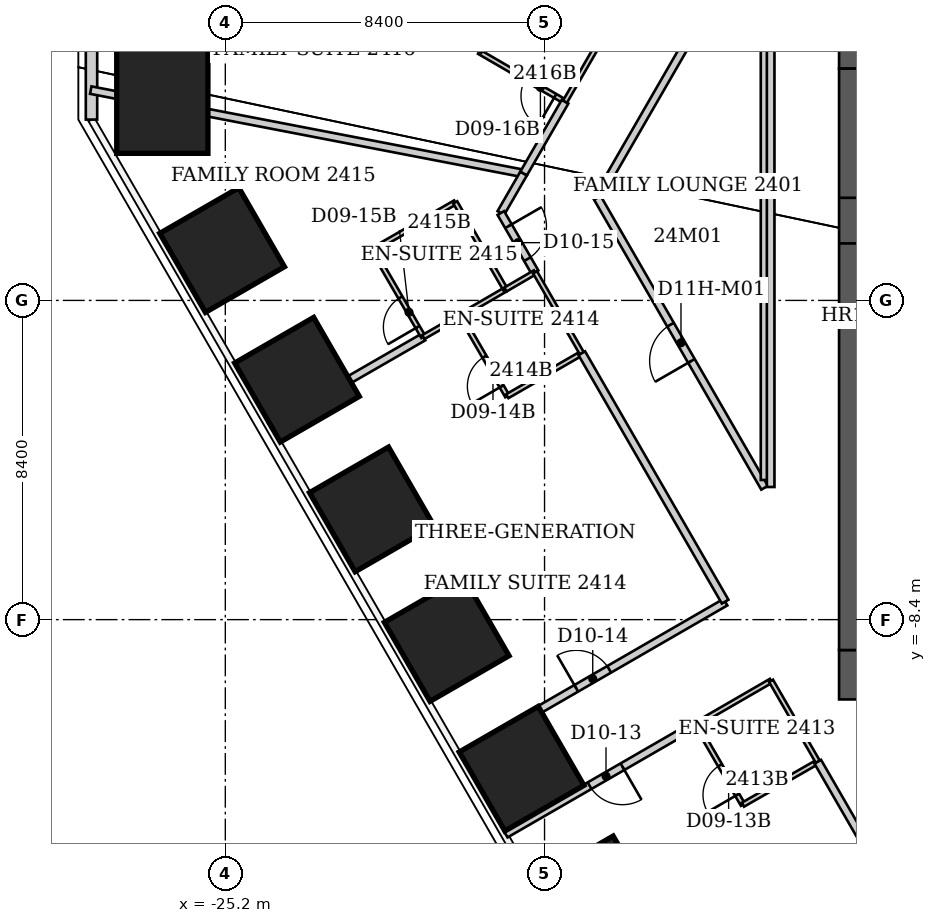
"""IFC4 building model, lengths in metres.
Left out: names, types, materials, properties, quantities, classifications, styles, units other than length and angle.
Written with IfcOpenShell. Run it as: python <this file> out.ifc"""

import sys

from ifc_helpers import new_model, si_unit, direction, frame, frame_2d, origin, origin_2d, place, context, subcontext, project, spatial, rectangle, extrude, element, fill, save


model = new_model("IFC4")
c1 = context("Model", 3, precision=1e-05, world=origin(), true_north=direction((0.0, 1.0)))
c2 = subcontext(c1, "Body", "Model", "MODEL_VIEW")
j1 = project(units=[si_unit("LENGTHUNIT", "METRE"), si_unit("PLANEANGLEUNIT", "RADIAN")], contexts=[c1])
p1 = place(None, origin())
s1 = spatial("IfcSite", under=j1, at=p1, CompositionType="ELEMENT")
p2 = place(p1, origin())
s2 = spatial("IfcBuilding", under=s1, at=p2, CompositionType="ELEMENT")
p3 = place(p2, frame((0.0, 0.0, 100.6)))
s3 = spatial("IfcBuildingStorey", under=s2, at=p3, CompositionType="ELEMENT", Elevation=100.6)
for number, where, z_axis, x_axis in (
    (1, (-15.434, -15.735, 0.0), (0.0, 0.0, 1.0), (-0.866, -0.5, 0.0)),
    (2, (-17.404, -12.323, 0.0), (0.0, 0.0, 1.0), (-0.866, -0.5, 0.0)),
    (3, (-19.374, -8.911, 0.0), (0.0, 0.0, 1.0), (-0.866, -0.5, 0.0)),
    (4, (-21.344, -5.499, 0.0), (0.0, 0.0, 1.0), (-0.866, -0.5, 0.0)),
    (5, (-23.314, -2.087, 0.0), (0.0, 0.0, 1.0), (-0.866, -0.5, 0.0)),
    (6, (-25.284, 1.325, 0.0), (0.0, 0.0, 1.0), (-0.866, -0.5, 0.0)),
):
    element("IfcColumn", number, at=place(p3, frame(where, z_axis=z_axis, x_axis=x_axis)), inside=s3, PredefinedType="COLUMN", context=c2, shape_type="SweptSolid", body=[
        extrude(rectangle(XDim=2.4, YDim=2.4, at=origin_2d()), origin(), (0.0, 0.0, 1.0), 3.8),
    ])
p4 = place(p3, frame((-26.857, 5.67, 0.0), z_axis=(0.0, 0.0, 1.0), x_axis=(-1.0, 0.0, 0.0)))
e7 = element("IfcColumn", 7, at=p4, inside=s3, PredefinedType="COLUMN", context=c2, shape_type="SweptSolid", body=[
    extrude(rectangle(XDim=2.4, YDim=3.6, at=origin_2d()), origin(), (0.0, 0.0, 1.0), 3.8),
])
p5 = place(p3, frame((-9.05, 6.75, 0.0), z_axis=(0.0, 0.0, 1.0), x_axis=(1.0, 0.0, 0.0)))
e8 = element("IfcWall", 8, at=p5, inside=s3, PredefinedType="SHEAR", context=c2, shape_type="SweptSolid", body=[
    extrude(rectangle(XDim=18.1, YDim=1.3, at=frame_2d((9.05, 0.0))), origin(), (0.0, 0.0, 1.0), 3.8),
])
p6 = place(p3, frame((-9.05, -9.85, 0.0), z_axis=(0.0, 0.0, 1.0), x_axis=(1.0, 0.0, 0.0)))
e9 = element("IfcWall", 9, at=p6, inside=s3, PredefinedType="SHEAR", context=c2, shape_type="SweptSolid", body=[
    extrude(rectangle(XDim=18.1, YDim=1.3, at=frame_2d((9.05, 0.0))), origin(), (0.0, 0.0, 1.0), 3.8),
])
p7 = place(p6, frame((1.938, 0.0, 0.0)))
e10 = element("IfcOpeningElement", 10, at=p7, cuts=e9, PredefinedType="OPENING", context=c2, shape_type="SweptSolid", body=[
    extrude(rectangle(XDim=1.1, YDim=2.2, at=frame_2d((0.55, 1.1))), frame((0.0, 0.65, 0.0), z_axis=(0.0, -1.0, 0.0), x_axis=(1.0, 0.0, 0.0)), (0.0, 0.0, 1.0), 1.3),
])
p8 = place(p6, frame((9.812, 0.0, 0.0)))
e11 = element("IfcOpeningElement", 11, at=p8, cuts=e9, PredefinedType="OPENING", context=c2, shape_type="SweptSolid", body=[
    extrude(rectangle(XDim=1.1, YDim=2.1, at=frame_2d((0.55, 1.05))), frame((0.0, 0.65, 0.0), z_axis=(0.0, -1.0, 0.0), x_axis=(1.0, 0.0, 0.0)), (0.0, 0.0, 1.0), 1.3),
])
p9 = place(p6, frame((12.438, 0.0, 0.0)))
e12 = element("IfcOpeningElement", 12, at=p9, cuts=e9, PredefinedType="OPENING", context=c2, shape_type="SweptSolid", body=[
    extrude(rectangle(XDim=1.1, YDim=2.1, at=frame_2d((0.55, 1.05))), frame((0.0, 0.65, 0.0), z_axis=(0.0, -1.0, 0.0), x_axis=(1.0, 0.0, 0.0)), (0.0, 0.0, 1.0), 1.3),
])
p10 = place(p6, frame((15.062, 0.0, 0.0)))
e13 = element("IfcOpeningElement", 13, at=p10, cuts=e9, PredefinedType="OPENING", context=c2, shape_type="SweptSolid", body=[
    extrude(rectangle(XDim=1.1, YDim=2.1, at=frame_2d((0.55, 1.05))), frame((0.0, 0.65, 0.0), z_axis=(0.0, -1.0, 0.0), x_axis=(1.0, 0.0, 0.0)), (0.0, 0.0, 1.0), 1.3),
])
p11 = place(p3, frame((-8.4, -9.2, 0.0), z_axis=(0.0, 0.0, 1.0), x_axis=(0.0, 1.0, 0.0)))
e14 = element("IfcWall", 14, at=p11, inside=s3, PredefinedType="SHEAR", context=c2, shape_type="SweptSolid", body=[
    extrude(rectangle(XDim=15.3, YDim=1.3, at=frame_2d((7.65, 0.0))), origin(), (0.0, 0.0, 1.0), 3.8),
])
p12 = place(p11, frame((10.7, 0.0, 0.0)))
e15 = element("IfcOpeningElement", 15, at=p12, cuts=e14, PredefinedType="OPENING", context=c2, shape_type="SweptSolid", body=[
    extrude(rectangle(XDim=1.2, YDim=2.2, at=frame_2d((0.6, 1.1))), frame((0.0, 0.65, 0.0), z_axis=(0.0, -1.0, 0.0), x_axis=(1.0, 0.0, 0.0)), (0.0, 0.0, 1.0), 1.3),
])
p13 = place(p3, frame((-28.721, 4.759, 0.0), z_axis=(0.0, 0.0, 1.0), x_axis=(0.0, 1.0, 0.0)))
e16 = element("IfcWall", 16, at=p13, inside=s3, PredefinedType="SOLIDWALL", context=c2, shape_type="SweptSolid", body=[
    extrude(rectangle(XDim=1.88, YDim=0.3, at=frame_2d((0.94, 0.0))), origin(), (0.0, 0.0, 1.0), 3.64),
])
p14 = place(p3, frame((-28.74, 5.534, 0.0), z_axis=(0.0, 0.0, 1.0), x_axis=(0.981941558077, -0.189184503913, 0.0)))
e17 = element("IfcWall", 17, at=p14, inside=s3, PredefinedType="PARTITIONING", context=c2, shape_type="SweptSolid", body=[
    extrude(rectangle(XDim=11.55, YDim=0.2, at=frame_2d((5.775, 0.0))), origin(), (0.0, 0.0, 1.0), 3.64),
])
p15 = place(p3, frame((-24.034, -3.295, 0.0), z_axis=(0.0, 0.0, 1.0), x_axis=(0.866451815884, 0.499260704193, 0.0)))
e18 = element("IfcWall", 18, at=p15, inside=s3, PredefinedType="PARTITIONING", context=c2, shape_type="SweptSolid", body=[
    extrude(rectangle(XDim=4.669, YDim=0.2, at=frame_2d((2.335, 0.0))), origin(), (0.0, 0.0, 1.0), 3.64),
])
p16 = place(p3, frame((-21.32, 1.33, 0.0), z_axis=(0.0, 0.0, 1.0), x_axis=(0.502242265546, -0.864726954997, 0.0)))
e19 = element("IfcWall", 19, at=p16, inside=s3, PredefinedType="PARTITIONING", context=c2, shape_type="SweptSolid", body=[
    extrude(rectangle(XDim=2.648, YDim=0.12, at=frame_2d((1.324, 0.0))), origin(), (0.0, 0.0, 1.0), 3.64),
])
p17 = place(p16, frame((1.448, 0.0, 0.0)))
e20 = element("IfcOpeningElement", 20, at=p17, cuts=e19, PredefinedType="OPENING", context=c2, shape_type="SweptSolid", body=[
    extrude(rectangle(XDim=0.9, YDim=2.03, at=frame_2d((0.45, 1.015))), frame((0.0, 0.06, 0.0), z_axis=(0.0, -1.0, 0.0), x_axis=(1.0, 0.0, 0.0)), (0.0, 0.0, 1.0), 0.12),
])
p18 = place(p3, frame((-19.988, -0.964, 0.0), z_axis=(0.0, 0.0, 1.0), x_axis=(0.866387145727, 0.49937292049, 0.0)))
e21 = element("IfcWall", 21, at=p18, inside=s3, PredefinedType="PARTITIONING", context=c2, shape_type="SweptSolid", body=[
    extrude(rectangle(XDim=1.129, YDim=0.12, at=frame_2d((0.564, 0.0))), origin(), (0.0, 0.0, 1.0), 3.64),
])
p19 = place(p3, frame((-19.15, 2.58, 0.0), z_axis=(0.0, 0.0, 1.0), x_axis=(-0.86653430447, -0.499117520406, 0.0)))
e22 = element("IfcWall", 22, at=p19, inside=s3, PredefinedType="PARTITIONING", context=c2, shape_type="SweptSolid", body=[
    extrude(rectangle(XDim=2.504, YDim=0.12, at=frame_2d((1.252, 0.0))), origin(), (0.0, 0.0, 1.0), 3.038),
])
p20 = place(p3, frame((-19.024, -11.975, 0.0), z_axis=(0.0, 0.0, 1.0), x_axis=(0.865863907772, 0.500279615034, 0.0)))
e23 = element("IfcWall", 23, at=p20, inside=s3, PredefinedType="PARTITIONING", context=c2, shape_type="SweptSolid", body=[
    extrude(rectangle(XDim=8.066, YDim=0.2, at=frame_2d((4.033, 0.0))), origin(), (0.0, 0.0, 1.0), 3.64),
])
p21 = place(p20, frame((3.533, 0.0, 0.0)))
e24 = element("IfcOpeningElement", 24, at=p21, cuts=e23, PredefinedType="OPENING", context=c2, shape_type="SweptSolid", body=[
    extrude(rectangle(XDim=1.0, YDim=2.13, at=frame_2d((0.5, 1.065))), frame((0.0, 0.1, 0.0), z_axis=(0.0, -1.0, 0.0), x_axis=(1.0, 0.0, 0.0)), (0.0, 0.0, 1.0), 0.2),
])
p22 = place(p3, frame((-19.01, -0.4, 0.0), z_axis=(0.0, 0.0, 1.0), x_axis=(0.864425960582, 0.502760140297, 0.0)))
e25 = element("IfcWall", 25, at=p22, inside=s3, PredefinedType="PARTITIONING", context=c2, shape_type="SweptSolid", body=[
    extrude(rectangle(XDim=1.367, YDim=0.12, at=frame_2d((0.684, 0.0))), origin(), (0.0, 0.0, 1.0), 3.64),
])
p23 = place(p3, frame((-19.01, -0.4, 0.0), z_axis=(0.0, 0.0, 1.0), x_axis=(0.501813488763, -0.864975850817, 0.0)))
e26 = element("IfcWall", 26, at=p23, inside=s3, PredefinedType="PARTITIONING", context=c2, shape_type="SweptSolid", body=[
    extrude(rectangle(XDim=2.451, YDim=0.12, at=frame_2d((1.226, 0.0))), origin(), (0.0, 0.0, 1.0), 3.64),
])
p24 = place(p23, frame((1.251, 0.0, 0.0)))
e27 = element("IfcOpeningElement", 27, at=p24, cuts=e26, PredefinedType="OPENING", context=c2, shape_type="SweptSolid", body=[
    extrude(rectangle(XDim=0.9, YDim=2.03, at=frame_2d((0.45, 1.015))), frame((0.0, 0.06, 0.0), z_axis=(0.0, -1.0, 0.0), x_axis=(1.0, 0.0, 0.0)), (0.0, 0.0, 1.0), 0.12),
])
p25 = place(p3, frame((-18.52, 6.54, 0.0), z_axis=(0.0, 0.0, 1.0), x_axis=(0.865155281359, -0.50150407689, 0.0)))
e28 = element("IfcWall", 28, at=p25, inside=s3, PredefinedType="PARTITIONING", context=c2, shape_type="SweptSolid", body=[
    extrude(rectangle(XDim=2.612, YDim=0.12, at=frame_2d((1.306, 0.0))), origin(), (0.0, 0.0, 1.0), 3.64),
])
p26 = place(p25, frame((1.412, 0.0, 0.0)))
e29 = element("IfcOpeningElement", 29, at=p26, cuts=e28, PredefinedType="OPENING", context=c2, shape_type="SweptSolid", body=[
    extrude(rectangle(XDim=0.9, YDim=2.03, at=frame_2d((0.45, 1.015))), frame((0.0, 0.06, 0.0), z_axis=(0.0, -1.0, 0.0), x_axis=(1.0, 0.0, 0.0)), (0.0, 0.0, 1.0), 0.12),
])
p27 = place(p3, frame((-17.95, 2.3, 0.0), z_axis=(0.0, 0.0, 1.0), x_axis=(0.499616828121, 0.866246515178, 0.0)))
e30 = element("IfcWall", 30, at=p27, inside=s3, PredefinedType="PARTITIONING", context=c2, shape_type="SweptSolid", body=[
    extrude(rectangle(XDim=1.201, YDim=0.2, at=frame_2d((0.6, 0.0))), origin(), (0.0, 0.0, 1.0), 3.64),
])
p28 = place(p3, frame((-17.95, 2.3, 0.0), z_axis=(0.0, 0.0, 1.0), x_axis=(0.499667687562, -0.866217179469, 0.0)))
e31 = element("IfcWall", 31, at=p28, inside=s3, PredefinedType="PARTITIONING", context=c2, shape_type="SweptSolid", body=[
    extrude(rectangle(XDim=1.801, YDim=0.2, at=frame_2d((0.9, 0.0))), origin(), (0.0, 0.0, 1.0), 3.64),
])
p29 = place(p28, frame((0.4, 0.0, 0.0)))
e32 = element("IfcOpeningElement", 32, at=p29, cuts=e31, PredefinedType="OPENING", context=c2, shape_type="SweptSolid", body=[
    extrude(rectangle(XDim=1.0, YDim=2.13, at=frame_2d((0.5, 1.065))), frame((0.0, 0.1, 0.0), z_axis=(0.0, -1.0, 0.0), x_axis=(1.0, 0.0, 0.0)), (0.0, 0.0, 1.0), 0.2),
])
p30 = place(p3, frame((-17.83, 0.29, 0.0), z_axis=(0.0, 0.0, 1.0), x_axis=(-0.499338582192, 0.866406936915, 0.0)))
e33 = element("IfcWall", 33, at=p30, inside=s3, PredefinedType="PARTITIONING", context=c2, shape_type="SweptSolid", body=[
    extrude(rectangle(XDim=2.643, YDim=0.12, at=frame_2d((1.322, 0.0))), origin(), (0.0, 0.0, 1.0), 3.64),
])
p31 = place(p3, frame((-17.828, 0.287, 0.0), z_axis=(0.0, 0.0, 1.0), x_axis=(0.864446899112, 0.502724137689, 0.0)))
e34 = element("IfcWall", 34, at=p31, inside=s3, PredefinedType="PARTITIONING", context=c2, shape_type="SweptSolid", body=[
    extrude(rectangle(XDim=0.9, YDim=0.12, at=frame_2d((0.45, 0.0))), origin(), (0.0, 0.0, 1.0), 3.64),
])
p32 = place(p3, frame((-17.824, -14.045, 0.0), z_axis=(0.0, 0.0, 1.0), x_axis=(0.866007919525, 0.500030282404, 0.0)))
e35 = element("IfcWall", 35, at=p32, inside=s3, PredefinedType="PARTITIONING", context=c2, shape_type="SweptSolid", body=[
    extrude(rectangle(XDim=5.79, YDim=0.2, at=frame_2d((2.895, 0.0))), origin(), (0.0, 0.0, 1.0), 3.64),
])
p33 = place(p32, frame((2.55, 0.0, 0.0)))
e36 = element("IfcOpeningElement", 36, at=p33, cuts=e35, PredefinedType="OPENING", context=c2, shape_type="SweptSolid", body=[
    extrude(rectangle(XDim=1.0, YDim=2.13, at=frame_2d((0.5, 1.065))), frame((0.0, 0.1, 0.0), z_axis=(0.0, -1.0, 0.0), x_axis=(1.0, 0.0, 0.0)), (0.0, 0.0, 1.0), 0.2),
])
p34 = place(p3, frame((-17.78, -2.52, 0.0), z_axis=(0.0, 0.0, 1.0), x_axis=(0.866304131286, 0.49951691875, 0.0)))
e37 = element("IfcWall", 37, at=p34, inside=s3, PredefinedType="PARTITIONING", context=c2, shape_type="SweptSolid", body=[
    extrude(rectangle(XDim=2.262, YDim=0.12, at=frame_2d((1.131, 0.0))), origin(), (0.0, 0.0, 1.0), 3.64),
])
p35 = place(p3, frame((-17.35, 3.34, 0.0), z_axis=(0.0, 0.0, 1.0), x_axis=(0.499641723021, 0.866232156305, 0.0)))
e38 = element("IfcWall", 38, at=p35, inside=s3, PredefinedType="PARTITIONING", context=c2, shape_type="SweptSolid", body=[
    extrude(rectangle(XDim=2.182, YDim=0.2, at=frame_2d((1.091, 0.0))), origin(), (0.0, 0.0, 1.0), 3.64),
])
p36 = place(p3, frame((-17.32, 8.62, 0.0), z_axis=(0.0, 0.0, 1.0), x_axis=(-0.499693115345, -0.866202511239, 0.0)))
e39 = element("IfcWall", 39, at=p36, inside=s3, PredefinedType="PARTITIONING", context=c2, shape_type="SweptSolid", body=[
    extrude(rectangle(XDim=2.401, YDim=0.12, at=frame_2d((1.201, 0.0))), origin(), (0.0, 0.0, 1.0), 3.64),
])
p37 = place(p3, frame((-17.05, 0.74, 0.0), z_axis=(0.0, 0.0, 1.0), x_axis=(0.500163488538, -0.865930993055, 0.0)))
e40 = element("IfcWall", 40, at=p37, inside=s3, PredefinedType="PARTITIONING", context=c2, shape_type="SweptSolid", body=[
    extrude(rectangle(XDim=2.46, YDim=0.12, at=frame_2d((1.23, 0.0))), origin(), (0.0, 0.0, 1.0), 3.64),
])
p38 = place(p3, frame((-16.261, 5.231, 0.0), z_axis=(0.0, 0.0, 1.0), x_axis=(0.500326720225, 0.865836689583, 0.0)))
e41 = element("IfcWall", 41, at=p38, inside=s3, PredefinedType="PARTITIONING", context=c2, shape_type="SweptSolid", body=[
    extrude(rectangle(XDim=2.401, YDim=0.12, at=frame_2d((1.201, 0.0))), origin(), (0.0, 0.0, 1.0), 3.64),
])
p39 = place(p3, frame((-15.82, -1.39, 0.0), z_axis=(0.0, 0.0, 1.0), x_axis=(0.499851259758, -0.866111261974, 0.0)))
e42 = element("IfcWall", 42, at=p39, inside=s3, PredefinedType="PARTITIONING", context=c2, shape_type="SweptSolid", body=[
    extrude(rectangle(XDim=7.548, YDim=0.2, at=frame_2d((3.774, 0.0))), origin(), (0.0, 0.0, 1.0), 3.64),
])
p40 = place(p3, frame((-15.41, 2.7, 0.0), z_axis=(0.0, 0.0, 1.0), x_axis=(0.500036278648, 0.866004457284, 0.0)))
e43 = element("IfcWall", 43, at=p40, inside=s3, PredefinedType="PARTITIONING", context=c2, shape_type="SweptSolid", body=[
    extrude(rectangle(XDim=8.799, YDim=0.2, at=frame_2d((4.399, 0.0))), origin(), (0.0, 0.0, 1.0), 3.64),
])
p41 = place(p3, frame((-12.81, -11.15, 0.0), z_axis=(0.0, 0.0, 1.0), x_axis=(0.501813488763, -0.864975850817, 0.0)))
e44 = element("IfcWall", 44, at=p41, inside=s3, PredefinedType="PARTITIONING", context=c2, shape_type="SweptSolid", body=[
    extrude(rectangle(XDim=2.451, YDim=0.12, at=frame_2d((1.226, 0.0))), origin(), (0.0, 0.0, 1.0), 3.64),
])
p42 = place(p41, frame((1.251, 0.0, 0.0)))
e45 = element("IfcOpeningElement", 45, at=p42, cuts=e44, PredefinedType="OPENING", context=c2, shape_type="SweptSolid", body=[
    extrude(rectangle(XDim=0.9, YDim=2.03, at=frame_2d((0.45, 1.015))), frame((0.0, 0.06, 0.0), z_axis=(0.0, -1.0, 0.0), x_axis=(1.0, 0.0, 0.0)), (0.0, 0.0, 1.0), 0.12),
])
p43 = place(p3, frame((-12.81, -11.15, 0.0), z_axis=(0.0, 0.0, 1.0), x_axis=(0.865543766642, 0.500833293649, 0.0)))
e46 = element("IfcWall", 46, at=p43, inside=s3, PredefinedType="PARTITIONING", context=c2, shape_type="SweptSolid", body=[
    extrude(rectangle(XDim=2.276, YDim=0.12, at=frame_2d((1.138, 0.0))), origin(), (0.0, 0.0, 1.0), 3.64),
])
p44 = place(p3, frame((-11.58, -13.27, 0.0), z_axis=(0.0, 0.0, 1.0), x_axis=(0.867428373024, 0.497562074192, 0.0)))
e47 = element("IfcWall", 47, at=p44, inside=s3, PredefinedType="PARTITIONING", context=c2, shape_type="SweptSolid", body=[
    extrude(rectangle(XDim=2.271, YDim=0.12, at=frame_2d((1.136, 0.0))), origin(), (0.0, 0.0, 1.0), 3.64),
])
p45 = place(p3, frame((-11.01, -4.93, 0.0), z_axis=(0.0, 0.0, 1.0), x_axis=(-0.499556067326, 0.866281556769, 0.0)))
e48 = element("IfcWall", 48, at=p45, inside=s3, PredefinedType="PARTITIONING", context=c2, shape_type="SweptSolid", body=[
    extrude(rectangle(XDim=8.808, YDim=0.2, at=frame_2d((4.404, 0.0))), origin(), (0.0, 0.0, 1.0), 3.64),
])
p46 = place(p45, frame((3.854, 0.0, 0.0)))
e49 = element("IfcOpeningElement", 49, at=p46, cuts=e48, PredefinedType="OPENING", context=c2, shape_type="SweptSolid", body=[
    extrude(rectangle(XDim=1.1, YDim=2.2, at=frame_2d((0.55, 1.1))), frame((0.0, 0.1, 0.0), z_axis=(0.0, -1.0, 0.0), x_axis=(1.0, 0.0, 0.0)), (0.0, 0.0, 1.0), 0.2),
])
p47 = place(p3, frame((-11.01, 10.115, 0.0), z_axis=(0.0, 0.0, 1.0), x_axis=(0.0, -1.0, 0.0)))
e50 = element("IfcWall", 50, at=p47, inside=s3, PredefinedType="PARTITIONING", context=c2, shape_type="SweptSolid", body=[
    extrude(rectangle(XDim=14.84, YDim=0.2, at=frame_2d((7.42, 0.0))), origin(), (0.0, 0.0, 1.0), 3.64),
])
p48 = place(p3, frame((-10.85, 9.2, 0.0), z_axis=(0.0, 0.0, 1.0), x_axis=(0.0, -1.0, 0.0)))
e51 = element("IfcWall", 51, at=p48, inside=s3, PredefinedType="PARTITIONING", context=c2, shape_type="SweptSolid", body=[
    extrude(rectangle(XDim=14.11, YDim=0.2, at=frame_2d((7.055, 0.0))), origin(), (0.0, 0.0, 1.0), 3.64),
])
p49 = place(p3, frame((-10.84, -10.01, 0.0), z_axis=(0.0, 0.0, 1.0), x_axis=(0.500089055364, -0.86597398154, 0.0)))
e52 = element("IfcWall", 52, at=p49, inside=s3, PredefinedType="PARTITIONING", context=c2, shape_type="SweptSolid", body=[
    extrude(rectangle(XDim=2.459, YDim=0.12, at=frame_2d((1.23, 0.0))), origin(), (0.0, 0.0, 1.0), 3.64),
])
p50 = place(p3, frame((-9.61, -12.14, 0.0), z_axis=(0.0, 0.0, 1.0), x_axis=(0.499898533245, -0.866083977718, 0.0)))
e53 = element("IfcWall", 53, at=p50, inside=s3, PredefinedType="PARTITIONING", context=c2, shape_type="SweptSolid", body=[
    extrude(rectangle(XDim=4.561, YDim=0.2, at=frame_2d((2.281, 0.0))), origin(), (0.0, 0.0, 1.0), 3.64),
])
p51 = place(p33, origin())
e54 = element("IfcDoor", 54, at=p51, inside=s3, OperationType="SINGLE_SWING_RIGHT", PredefinedType="DOOR", context=c2, shape_type="SweptSolid", body=[
    extrude(rectangle(XDim=1.0, YDim=2.13, at=frame_2d((0.5, 1.065))), frame((0.0, 0.025, 0.0), z_axis=(0.0, -1.0, 0.0), x_axis=(1.0, 0.0, 0.0)), (0.0, 0.0, 1.0), 0.05),
])
fill(e36, e54)
p52 = place(p42, origin())
e55 = element("IfcDoor", 55, at=p52, inside=s3, OperationType="SINGLE_SWING_RIGHT", PredefinedType="DOOR", context=c2, shape_type="SweptSolid", body=[
    extrude(rectangle(XDim=0.9, YDim=2.03, at=frame_2d((0.45, 1.015))), frame((0.0, 0.025, 0.0), z_axis=(0.0, -1.0, 0.0), x_axis=(1.0, 0.0, 0.0)), (0.0, 0.0, 1.0), 0.05),
])
fill(e45, e55)
p53 = place(p21, origin())
e56 = element("IfcDoor", 56, at=p53, inside=s3, OperationType="SINGLE_SWING_LEFT", PredefinedType="DOOR", context=c2, shape_type="SweptSolid", body=[
    extrude(rectangle(XDim=1.0, YDim=2.13, at=frame_2d((0.5, 1.065))), frame((0.0, 0.025, 0.0), z_axis=(0.0, -1.0, 0.0), x_axis=(1.0, 0.0, 0.0)), (0.0, 0.0, 1.0), 0.05),
])
fill(e24, e56)
p54 = place(p24, origin())
e57 = element("IfcDoor", 57, at=p54, inside=s3, OperationType="SINGLE_SWING_RIGHT", PredefinedType="DOOR", context=c2, shape_type="SweptSolid", body=[
    extrude(rectangle(XDim=0.9, YDim=2.03, at=frame_2d((0.45, 1.015))), frame((0.0, 0.025, 0.0), z_axis=(0.0, -1.0, 0.0), x_axis=(1.0, 0.0, 0.0)), (0.0, 0.0, 1.0), 0.05),
])
fill(e27, e57)
p55 = place(p29, origin())
e58 = element("IfcDoor", 58, at=p55, inside=s3, OperationType="SINGLE_SWING_LEFT", PredefinedType="DOOR", context=c2, shape_type="SweptSolid", body=[
    extrude(rectangle(XDim=1.0, YDim=2.13, at=frame_2d((0.5, 1.065))), frame((0.0, 0.025, 0.0), z_axis=(0.0, -1.0, 0.0), x_axis=(1.0, 0.0, 0.0)), (0.0, 0.0, 1.0), 0.05),
])
fill(e32, e58)
p56 = place(p17, origin())
e59 = element("IfcDoor", 59, at=p56, inside=s3, OperationType="SINGLE_SWING_RIGHT", PredefinedType="DOOR", context=c2, shape_type="SweptSolid", body=[
    extrude(rectangle(XDim=0.9, YDim=2.03, at=frame_2d((0.45, 1.015))), frame((0.0, 0.025, 0.0), z_axis=(0.0, -1.0, 0.0), x_axis=(1.0, 0.0, 0.0)), (0.0, 0.0, 1.0), 0.05),
])
fill(e20, e59)
p57 = place(p26, origin())
e60 = element("IfcDoor", 60, at=p57, inside=s3, OperationType="SINGLE_SWING_RIGHT", PredefinedType="DOOR", context=c2, shape_type="SweptSolid", body=[
    extrude(rectangle(XDim=0.9, YDim=2.03, at=frame_2d((0.45, 1.015))), frame((0.0, 0.025, 0.0), z_axis=(0.0, -1.0, 0.0), x_axis=(1.0, 0.0, 0.0)), (0.0, 0.0, 1.0), 0.05),
])
fill(e29, e60)
p58 = place(p46, origin())
e61 = element("IfcDoor", 61, at=p58, inside=s3, OperationType="SINGLE_SWING_LEFT", PredefinedType="DOOR", context=c2, shape_type="SweptSolid", body=[
    extrude(rectangle(XDim=1.1, YDim=2.2, at=frame_2d((0.55, 1.1))), frame((0.0, 0.025, 0.0), z_axis=(0.0, -1.0, 0.0), x_axis=(1.0, 0.0, 0.0)), (0.0, 0.0, 1.0), 0.05),
])
fill(e49, e61)
save(model, sys.argv[1])
